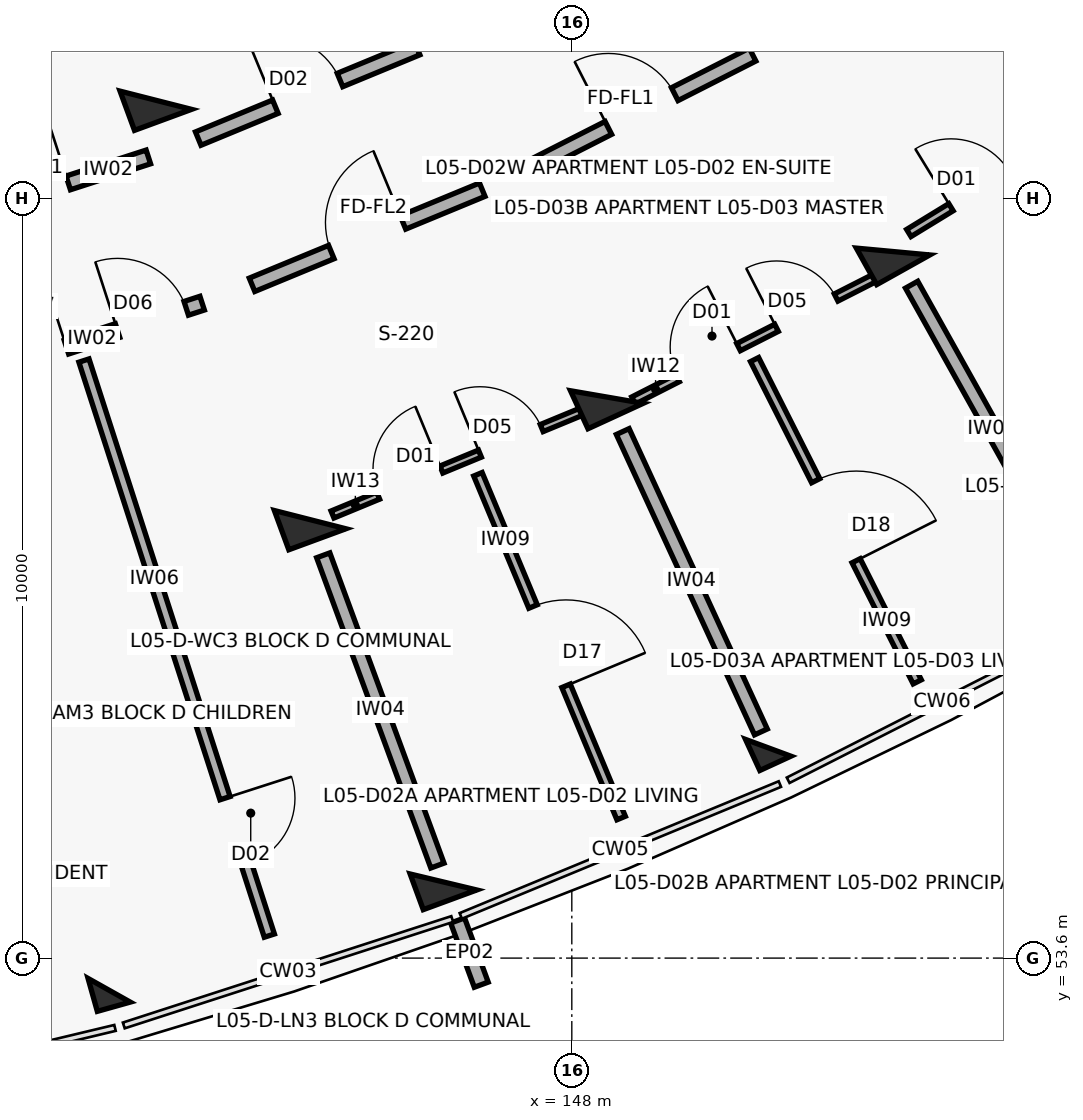
"""IFC4 building model, lengths in metres.
Left out: names, types, materials, properties, quantities, classifications, styles, units other than length and angle.
Written with IfcOpenShell. Run it as: python <this file> out.ifc"""

import sys

from ifc_helpers import new_model, si_unit, direction, frame, frame_2d, origin, origin_2d, place, context, subcontext, project, spatial, rectangle, extrude, element, fill, save


model = new_model("IFC4")
c1 = context("Model", 3, precision=1e-05, world=origin(), true_north=direction((0.0, 1.0)))
c2 = subcontext(c1, "Body", "Model", "MODEL_VIEW")
j1 = project(units=[si_unit("LENGTHUNIT", "METRE"), si_unit("PLANEANGLEUNIT", "RADIAN")], contexts=[c1])
p1 = place(None, origin())
s1 = spatial("IfcSite", under=j1, at=p1, CompositionType="ELEMENT")
p2 = place(p1, origin())
s2 = spatial("IfcBuilding", under=s1, at=p2, CompositionType="ELEMENT")
p3 = place(p2, frame((0.0, 0.0, 17.4)))
s3 = spatial("IfcBuildingStorey", under=s2, at=p3, CompositionType="ELEMENT", Elevation=17.4)
p4 = place(p3, frame((141.913, 53.177, 0.0), z_axis=(0.0, 0.0, 1.0), x_axis=(0.270600445976, -0.962691746426, 0.0)))
e1 = element("IfcColumn", 1, at=p4, inside=s3, PredefinedType="COLUMN", context=c2, shape_type="SweptSolid", body=[
    extrude(rectangle(XDim=0.45, YDim=0.45, at=origin_2d()), origin(), (0.0, 0.0, 1.0), 3.1),
])
for number, where, z_axis, x_axis in (
    (2, (142.527, 64.887, 0.0), (0.0, 0.0, 1.0), (0.345, -0.938, 0.0)),
    (3, (144.557, 59.369, 0.0), (0.0, 0.0, 1.0), (0.345, -0.938, 0.0)),
):
    element("IfcColumn", number, at=place(p3, frame(where, z_axis=z_axis, x_axis=x_axis)), inside=s3, PredefinedType="COLUMN", context=c2, shape_type="SweptSolid", body=[
        extrude(rectangle(XDim=0.55, YDim=0.8, at=origin_2d()), origin(), (0.0, 0.0, 1.0), 3.1),
    ])
p5 = place(p3, frame((146.311, 54.602, 0.0), z_axis=(0.0, 0.0, 1.0), x_axis=(0.345298198999, -0.93849302276, 0.0)))
e4 = element("IfcColumn", 4, at=p5, inside=s3, PredefinedType="COLUMN", context=c2, shape_type="SweptSolid", body=[
    extrude(rectangle(XDim=0.5, YDim=0.75, at=origin_2d()), origin(), (0.0, 0.0, 1.0), 3.1),
])
p6 = place(p3, frame((148.461, 60.982, 0.0), z_axis=(0.0, 0.0, 1.0), x_axis=(0.417867073801, -0.908508177527, 0.0)))
e5 = element("IfcColumn", 5, at=p6, inside=s3, PredefinedType="COLUMN", context=c2, shape_type="SweptSolid", body=[
    extrude(rectangle(XDim=0.55, YDim=0.8, at=origin_2d()), origin(), (0.0, 0.0, 1.0), 3.1),
])
p7 = place(p3, frame((150.584, 56.367, 0.0), z_axis=(0.0, 0.0, 1.0), x_axis=(0.417867073801, -0.908508177527, 0.0)))
e6 = element("IfcColumn", 6, at=p7, inside=s3, PredefinedType="COLUMN", context=c2, shape_type="SweptSolid", body=[
    extrude(rectangle(XDim=0.45, YDim=0.45, at=origin_2d()), origin(), (0.0, 0.0, 1.0), 3.1),
])
p8 = place(p3, frame((152.227, 62.897, 0.0), z_axis=(0.0, 0.0, 1.0), x_axis=(0.487859659139, -0.87292207727, 0.0)))
e7 = element("IfcColumn", 7, at=p8, inside=s3, PredefinedType="COLUMN", context=c2, shape_type="SweptSolid", body=[
    extrude(rectangle(XDim=0.55, YDim=0.8, at=origin_2d()), origin(), (0.0, 0.0, 1.0), 3.1),
])
p9 = place(p3, frame((146.498, 54.095, 0.0), z_axis=(0.0, 0.0, 1.0), x_axis=(0.34529052391, -0.938495846607, 0.0)))
e8 = element("IfcWall", 8, at=p9, inside=s3, PredefinedType="PARAPET", context=c2, shape_type="SweptSolid", body=[
    extrude(rectangle(XDim=0.9, YDim=0.195, at=frame_2d((0.45, 0.0))), origin(), (0.0, 0.0, 1.0), 2.25),
])
p10 = place(p3, frame((140.019, 61.208, 0.0), z_axis=(0.0, 0.0, 1.0), x_axis=(0.951323803878, 0.308193154005, 0.0)))
e9 = element("IfcWall", 9, at=p10, inside=s3, PredefinedType="SOLIDWALL", context=c2, shape_type="SweptSolid", body=[
    extrude(rectangle(XDim=3.277, YDim=0.19, at=frame_2d((1.639, 0.0))), origin(), (0.0, 0.0, 1.0), 2.08),
])
p11 = place(p10, frame((0.28, 0.0, 0.0)))
e10 = element("IfcOpeningElement", 10, at=p11, cuts=e9, PredefinedType="OPENING", context=c2, shape_type="SweptSolid", body=[
    extrude(rectangle(XDim=1.12, YDim=2.15, at=frame_2d((0.56, 1.075))), frame((0.0, 0.105, 0.0), z_axis=(0.0, -1.0, 0.0), x_axis=(1.0, 0.0, 0.0)), (0.0, 0.0, 1.0), 0.21),
])
p12 = place(p10, frame((2.107, 0.0, 0.0)))
e11 = element("IfcOpeningElement", 11, at=p12, cuts=e9, PredefinedType="OPENING", context=c2, shape_type="SweptSolid", body=[
    extrude(rectangle(XDim=0.95, YDim=2.1, at=frame_2d((0.475, 1.05))), frame((0.0, 0.105, 0.0), z_axis=(0.0, -1.0, 0.0), x_axis=(1.0, 0.0, 0.0)), (0.0, 0.0, 1.0), 0.21),
])
p13 = place(p3, frame((139.464, 63.181, 0.0), z_axis=(0.0, 0.0, 1.0), x_axis=(0.951336474448, 0.308154040027, 0.0)))
e12 = element("IfcWall", 12, at=p13, inside=s3, PredefinedType="SOLIDWALL", context=c2, shape_type="SweptSolid", body=[
    extrude(rectangle(XDim=3.116, YDim=0.19, at=frame_2d((1.558, 0.0))), origin(), (0.0, 0.0, 1.0), 2.08),
])
p14 = place(p13, frame((1.108, 0.0, 0.0)))
e13 = element("IfcOpeningElement", 13, at=p14, cuts=e12, PredefinedType="OPENING", context=c2, shape_type="SweptSolid", body=[
    extrude(rectangle(XDim=0.9, YDim=2.1, at=frame_2d((0.45, 1.05))), frame((0.0, 0.105, 0.0), z_axis=(0.0, -1.0, 0.0), x_axis=(1.0, 0.0, 0.0)), (0.0, 0.0, 1.0), 0.21),
])
p15 = place(p3, frame((141.581, 61.462, 0.0), z_axis=(0.0, 0.0, 1.0), x_axis=(0.306824216212, -0.951766200464, 0.0)))
e14 = element("IfcWall", 14, at=p15, inside=s3, PredefinedType="PARTITIONING", context=c2, shape_type="SweptSolid", body=[
    extrude(rectangle(XDim=7.95, YDim=0.14, at=frame_2d((3.975, 0.0))), origin(), (0.0, 0.0, 1.0), 2.08),
])
p16 = place(p15, frame((6.05, 0.0, 0.0)))
e15 = element("IfcOpeningElement", 15, at=p16, cuts=e14, PredefinedType="OPENING", context=c2, shape_type="SweptSolid", body=[
    extrude(rectangle(XDim=0.92, YDim=2.1, at=frame_2d((0.46, 1.05))), frame((0.0, 0.08, 0.0), z_axis=(0.0, -1.0, 0.0), x_axis=(1.0, 0.0, 0.0)), (0.0, 0.0, 1.0), 0.16),
])
p17 = place(p3, frame((143.793, 62.459, 0.0), z_axis=(0.0, 0.0, 1.0), x_axis=(0.924214561665, 0.381873596896, 0.0)))
e16 = element("IfcWall", 16, at=p17, inside=s3, PredefinedType="SOLIDWALL", context=c2, shape_type="SweptSolid", body=[
    extrude(rectangle(XDim=3.277, YDim=0.19, at=frame_2d((1.639, 0.0))), origin(), (0.0, 0.0, 1.0), 2.08),
])
p18 = place(p17, frame((1.128, 0.0, 0.0)))
e17 = element("IfcOpeningElement", 17, at=p18, cuts=e16, PredefinedType="OPENING", context=c2, shape_type="SweptSolid", body=[
    extrude(rectangle(XDim=1.02, YDim=2.15, at=frame_2d((0.51, 1.075))), frame((0.0, 0.105, 0.0), z_axis=(0.0, -1.0, 0.0), x_axis=(1.0, 0.0, 0.0)), (0.0, 0.0, 1.0), 0.21),
])
p19 = place(p3, frame((143.085, 64.383, 0.0), z_axis=(0.0, 0.0, 1.0), x_axis=(0.924213340202, 0.381876553081, 0.0)))
e18 = element("IfcWall", 18, at=p19, inside=s3, PredefinedType="SOLIDWALL", context=c2, shape_type="SweptSolid", body=[
    extrude(rectangle(XDim=3.116, YDim=0.19, at=frame_2d((1.558, 0.0))), origin(), (0.0, 0.0, 1.0), 2.08),
])
p20 = place(p19, frame((1.098, 0.0, 0.0)))
e19 = element("IfcOpeningElement", 19, at=p20, cuts=e18, PredefinedType="OPENING", context=c2, shape_type="SweptSolid", body=[
    extrude(rectangle(XDim=0.92, YDim=2.1, at=frame_2d((0.46, 1.05))), frame((0.0, 0.105, 0.0), z_axis=(0.0, -1.0, 0.0), x_axis=(1.0, 0.0, 0.0)), (0.0, 0.0, 1.0), 0.21),
])
p21 = place(p3, frame((144.852, 59.437, 0.0), z_axis=(0.0, 0.0, 1.0), x_axis=(0.924217547919, 0.381866369453, 0.0)))
e20 = element("IfcWall", 20, at=p21, inside=s3, PredefinedType="PARTITIONING", context=c2, shape_type="SweptSolid", body=[
    extrude(rectangle(XDim=3.628, YDim=0.1, at=frame_2d((1.814, 0.0))), origin(), (0.0, 0.0, 1.0), 2.08),
])
p22 = place(p21, frame((0.65, 0.0, 0.0)))
e21 = element("IfcOpeningElement", 21, at=p22, cuts=e20, PredefinedType="OPENING", context=c2, shape_type="SweptSolid", body=[
    extrude(rectangle(XDim=0.9, YDim=2.1, at=frame_2d((0.45, 1.05))), frame((0.0, 0.06, 0.0), z_axis=(0.0, -1.0, 0.0), x_axis=(1.0, 0.0, 0.0)), (0.0, 0.0, 1.0), 0.12),
])
p23 = place(p21, frame((2.098, 0.0, 0.0)))
e22 = element("IfcOpeningElement", 22, at=p23, cuts=e20, PredefinedType="OPENING", context=c2, shape_type="SweptSolid", body=[
    extrude(rectangle(XDim=0.88, YDim=2.1, at=frame_2d((0.44, 1.05))), frame((0.0, 0.06, 0.0), z_axis=(0.0, -1.0, 0.0), x_axis=(1.0, 0.0, 0.0)), (0.0, 0.0, 1.0), 0.12),
])
p24 = place(p3, frame((146.765, 59.966, 0.0), z_axis=(0.0, 0.0, 1.0), x_axis=(0.384548164276, -0.923104928679, 0.0)))
e23 = element("IfcWall", 23, at=p24, inside=s3, PredefinedType="PARTITIONING", context=c2, shape_type="SweptSolid", body=[
    extrude(rectangle(XDim=4.9, YDim=0.12, at=frame_2d((2.45, 0.0))), origin(), (0.0, 0.0, 1.0), 2.08),
])
p25 = place(p24, frame((1.885, 0.0, 0.0)))
e24 = element("IfcOpeningElement", 24, at=p25, cuts=e23, PredefinedType="OPENING", context=c2, shape_type="SweptSolid", body=[
    extrude(rectangle(XDim=1.13, YDim=2.1, at=frame_2d((0.565, 1.05))), frame((0.0, 0.07, 0.0), z_axis=(0.0, -1.0, 0.0), x_axis=(1.0, 0.0, 0.0)), (0.0, 0.0, 1.0), 0.14),
])
p26 = place(p3, frame((144.73, 58.9, 0.0), z_axis=(0.0, 0.0, 1.0), x_axis=(0.345273579683, -0.938502080537, 0.0)))
e25 = element("IfcWall", 25, at=p26, inside=s3, PredefinedType="SOLIDWALL", context=c2, shape_type="SweptSolid", body=[
    extrude(rectangle(XDim=4.35, YDim=0.185, at=frame_2d((2.175, 0.0))), origin(), (0.0, 0.0, 1.0), 2.08),
])
p27 = place(p3, frame((147.457, 64.003, 0.0), z_axis=(0.0, 0.0, 1.0), x_axis=(0.891412167565, 0.45319349898, 0.0)))
e26 = element("IfcWall", 26, at=p27, inside=s3, PredefinedType="SOLIDWALL", context=c2, shape_type="SweptSolid", body=[
    extrude(rectangle(XDim=3.277, YDim=0.19, at=frame_2d((1.639, 0.0))), origin(), (0.0, 0.0, 1.0), 2.08),
])
p28 = place(p27, frame((1.148, 0.0, 0.0)))
e27 = element("IfcOpeningElement", 27, at=p28, cuts=e26, PredefinedType="OPENING", context=c2, shape_type="SweptSolid", body=[
    extrude(rectangle(XDim=0.98, YDim=2.15, at=frame_2d((0.49, 1.075))), frame((0.0, 0.105, 0.0), z_axis=(0.0, -1.0, 0.0), x_axis=(1.0, 0.0, 0.0)), (0.0, 0.0, 1.0), 0.21),
])
p29 = place(p3, frame((148.812, 60.937, 0.0), z_axis=(0.0, 0.0, 1.0), x_axis=(0.89140212369, 0.453213254309, 0.0)))
e28 = element("IfcWall", 28, at=p29, inside=s3, PredefinedType="PARTITIONING", context=c2, shape_type="SweptSolid", body=[
    extrude(rectangle(XDim=3.64, YDim=0.105, at=frame_2d((1.82, 0.0))), origin(), (0.0, 0.0, 1.0), 2.08),
])
p30 = place(p29, frame((0.65, 0.0, 0.0)))
e29 = element("IfcOpeningElement", 29, at=p30, cuts=e28, PredefinedType="OPENING", context=c2, shape_type="SweptSolid", body=[
    extrude(rectangle(XDim=0.9, YDim=2.1, at=frame_2d((0.45, 1.05))), frame((0.0, 0.062, 0.0), z_axis=(0.0, -1.0, 0.0), x_axis=(1.0, 0.0, 0.0)), (0.0, 0.0, 1.0), 0.125),
])
p31 = place(p29, frame((2.11, 0.0, 0.0)))
e30 = element("IfcOpeningElement", 30, at=p31, cuts=e28, PredefinedType="OPENING", context=c2, shape_type="SweptSolid", body=[
    extrude(rectangle(XDim=0.88, YDim=2.1, at=frame_2d((0.44, 1.05))), frame((0.0, 0.062, 0.0), z_axis=(0.0, -1.0, 0.0), x_axis=(1.0, 0.0, 0.0)), (0.0, 0.0, 1.0), 0.125),
])
p32 = place(p3, frame((150.404, 61.475, 0.0), z_axis=(0.0, 0.0, 1.0), x_axis=(0.450664257057, -0.892693523787, 0.0)))
e31 = element("IfcWall", 31, at=p32, inside=s3, PredefinedType="PARTITIONING", context=c2, shape_type="SweptSolid", body=[
    extrude(rectangle(XDim=4.75, YDim=0.12, at=frame_2d((2.375, 0.0))), origin(), (0.0, 0.0, 1.0), 2.08),
])
p33 = place(p32, frame((1.785, 0.0, 0.0)))
e32 = element("IfcOpeningElement", 32, at=p33, cuts=e31, PredefinedType="OPENING", context=c2, shape_type="SweptSolid", body=[
    extrude(rectangle(XDim=1.18, YDim=2.1, at=frame_2d((0.59, 1.05))), frame((0.0, 0.07, 0.0), z_axis=(0.0, -1.0, 0.0), x_axis=(1.0, 0.0, 0.0)), (0.0, 0.0, 1.0), 0.14),
])
p34 = place(p3, frame((148.67, 60.528, 0.0), z_axis=(0.0, 0.0, 1.0), x_axis=(0.417837051164, -0.908521985796, 0.0)))
e33 = element("IfcWall", 33, at=p34, inside=s3, PredefinedType="SOLIDWALL", context=c2, shape_type="SweptSolid", body=[
    extrude(rectangle(XDim=4.35, YDim=0.185, at=frame_2d((2.175, 0.0))), origin(), (0.0, 0.0, 1.0), 2.08),
])
p35 = place(p3, frame((152.434, 63.141, 0.0), z_axis=(0.0, 0.0, 1.0), x_axis=(0.853089873067, 0.521763996909, 0.0)))
e34 = element("IfcWall", 34, at=p35, inside=s3, PredefinedType="PARTITIONING", context=c2, shape_type="SweptSolid", body=[
    extrude(rectangle(XDim=3.616, YDim=0.11, at=frame_2d((1.808, 0.0))), origin(), (0.0, 0.0, 1.0), 2.08),
])
p36 = place(p35, frame((0.65, 0.0, 0.0)))
e35 = element("IfcOpeningElement", 35, at=p36, cuts=e34, PredefinedType="OPENING", context=c2, shape_type="SweptSolid", body=[
    extrude(rectangle(XDim=0.9, YDim=2.1, at=frame_2d((0.45, 1.05))), frame((0.0, 0.065, 0.0), z_axis=(0.0, -1.0, 0.0), x_axis=(1.0, 0.0, 0.0)), (0.0, 0.0, 1.0), 0.13),
])
p37 = place(p35, frame((2.086, 0.0, 0.0)))
e36 = element("IfcOpeningElement", 36, at=p37, cuts=e34, PredefinedType="OPENING", context=c2, shape_type="SweptSolid", body=[
    extrude(rectangle(XDim=0.88, YDim=2.1, at=frame_2d((0.44, 1.05))), frame((0.0, 0.065, 0.0), z_axis=(0.0, -1.0, 0.0), x_axis=(1.0, 0.0, 0.0)), (0.0, 0.0, 1.0), 0.13),
])
p38 = place(p3, frame((152.471, 62.46, 0.0), z_axis=(0.0, 0.0, 1.0), x_axis=(0.487866639184, -0.872918176218, 0.0)))
e37 = element("IfcWall", 37, at=p38, inside=s3, PredefinedType="SOLIDWALL", context=c2, shape_type="SweptSolid", body=[
    extrude(rectangle(XDim=4.35, YDim=0.185, at=frame_2d((2.175, 0.0))), origin(), (0.0, 0.0, 1.0), 2.08),
])
p39 = place(p11, origin())
e38 = element("IfcDoor", 38, at=p39, inside=s3, OperationType="SINGLE_SWING_RIGHT", PredefinedType="DOOR", context=c2, shape_type="SweptSolid", body=[
    extrude(rectangle(XDim=1.12, YDim=2.15, at=frame_2d((0.56, 1.075))), frame((0.0, 0.025, 0.0), z_axis=(0.0, -1.0, 0.0), x_axis=(1.0, 0.0, 0.0)), (0.0, 0.0, 1.0), 0.05),
])
fill(e10, e38)
p40 = place(p12, origin())
e39 = element("IfcDoor", 39, at=p40, inside=s3, OperationType="SINGLE_SWING_LEFT", PredefinedType="DOOR", context=c2, shape_type="SweptSolid", body=[
    extrude(rectangle(XDim=0.95, YDim=2.1, at=frame_2d((0.475, 1.05))), frame((0.0, 0.025, 0.0), z_axis=(0.0, -1.0, 0.0), x_axis=(1.0, 0.0, 0.0)), (0.0, 0.0, 1.0), 0.05),
])
fill(e11, e39)
p41 = place(p14, origin())
e40 = element("IfcDoor", 40, at=p41, inside=s3, OperationType="SINGLE_SWING_RIGHT", PredefinedType="DOOR", context=c2, shape_type="SweptSolid", body=[
    extrude(rectangle(XDim=0.9, YDim=2.1, at=frame_2d((0.45, 1.05))), frame((0.0, 0.025, 0.0), z_axis=(0.0, -1.0, 0.0), x_axis=(1.0, 0.0, 0.0)), (0.0, 0.0, 1.0), 0.05),
])
fill(e13, e40)
p42 = place(p16, origin())
e41 = element("IfcDoor", 41, at=p42, inside=s3, OperationType="SINGLE_SWING_LEFT", PredefinedType="DOOR", context=c2, shape_type="SweptSolid", body=[
    extrude(rectangle(XDim=0.92, YDim=2.1, at=frame_2d((0.46, 1.05))), frame((0.0, 0.025, 0.0), z_axis=(0.0, -1.0, 0.0), x_axis=(1.0, 0.0, 0.0)), (0.0, 0.0, 1.0), 0.05),
])
fill(e15, e41)
p43 = place(p18, origin())
e42 = element("IfcDoor", 42, at=p43, inside=s3, OperationType="SINGLE_SWING_RIGHT", PredefinedType="DOOR", context=c2, shape_type="SweptSolid", body=[
    extrude(rectangle(XDim=1.02, YDim=2.15, at=frame_2d((0.51, 1.075))), frame((0.0, 0.025, 0.0), z_axis=(0.0, -1.0, 0.0), x_axis=(1.0, 0.0, 0.0)), (0.0, 0.0, 1.0), 0.05),
])
fill(e17, e42)
p44 = place(p20, origin())
e43 = element("IfcDoor", 43, at=p44, inside=s3, OperationType="SINGLE_SWING_LEFT", PredefinedType="DOOR", context=c2, shape_type="SweptSolid", body=[
    extrude(rectangle(XDim=0.92, YDim=2.1, at=frame_2d((0.46, 1.05))), frame((0.0, 0.025, 0.0), z_axis=(0.0, -1.0, 0.0), x_axis=(1.0, 0.0, 0.0)), (0.0, 0.0, 1.0), 0.05),
])
fill(e19, e43)
p45 = place(p22, origin())
e44 = element("IfcDoor", 44, at=p45, inside=s3, OperationType="SINGLE_SWING_RIGHT", PredefinedType="DOOR", context=c2, shape_type="SweptSolid", body=[
    extrude(rectangle(XDim=0.9, YDim=2.1, at=frame_2d((0.45, 1.05))), frame((0.0, 0.025, 0.0), z_axis=(0.0, -1.0, 0.0), x_axis=(1.0, 0.0, 0.0)), (0.0, 0.0, 1.0), 0.05),
])
fill(e21, e44)
p46 = place(p23, origin())
e45 = element("IfcDoor", 45, at=p46, inside=s3, OperationType="SINGLE_SWING_LEFT", PredefinedType="DOOR", context=c2, shape_type="SweptSolid", body=[
    extrude(rectangle(XDim=0.88, YDim=2.1, at=frame_2d((0.44, 1.05))), frame((0.0, 0.025, 0.0), z_axis=(0.0, -1.0, 0.0), x_axis=(1.0, 0.0, 0.0)), (0.0, 0.0, 1.0), 0.05),
])
fill(e22, e45)
p47 = place(p25, origin())
e46 = element("IfcDoor", 46, at=p47, inside=s3, OperationType="SINGLE_SWING_RIGHT", PredefinedType="DOOR", context=c2, shape_type="SweptSolid", body=[
    extrude(rectangle(XDim=1.13, YDim=2.1, at=frame_2d((0.565, 1.05))), frame((0.0, 0.025, 0.0), z_axis=(0.0, -1.0, 0.0), x_axis=(1.0, 0.0, 0.0)), (0.0, 0.0, 1.0), 0.05),
])
fill(e24, e46)
p48 = place(p28, origin())
e47 = element("IfcDoor", 47, at=p48, inside=s3, OperationType="SINGLE_SWING_LEFT", PredefinedType="DOOR", context=c2, shape_type="SweptSolid", body=[
    extrude(rectangle(XDim=0.98, YDim=2.15, at=frame_2d((0.49, 1.075))), frame((0.0, 0.025, 0.0), z_axis=(0.0, -1.0, 0.0), x_axis=(1.0, 0.0, 0.0)), (0.0, 0.0, 1.0), 0.05),
])
fill(e27, e47)
p49 = place(p30, origin())
e48 = element("IfcDoor", 48, at=p49, inside=s3, OperationType="SINGLE_SWING_RIGHT", PredefinedType="DOOR", context=c2, shape_type="SweptSolid", body=[
    extrude(rectangle(XDim=0.9, YDim=2.1, at=frame_2d((0.45, 1.05))), frame((0.0, 0.025, 0.0), z_axis=(0.0, -1.0, 0.0), x_axis=(1.0, 0.0, 0.0)), (0.0, 0.0, 1.0), 0.05),
])
fill(e29, e48)
p50 = place(p31, origin())
e49 = element("IfcDoor", 49, at=p50, inside=s3, OperationType="SINGLE_SWING_LEFT", PredefinedType="DOOR", context=c2, shape_type="SweptSolid", body=[
    extrude(rectangle(XDim=0.88, YDim=2.1, at=frame_2d((0.44, 1.05))), frame((0.0, 0.025, 0.0), z_axis=(0.0, -1.0, 0.0), x_axis=(1.0, 0.0, 0.0)), (0.0, 0.0, 1.0), 0.05),
])
fill(e30, e49)
p51 = place(p33, origin())
e50 = element("IfcDoor", 50, at=p51, inside=s3, OperationType="SINGLE_SWING_RIGHT", PredefinedType="DOOR", context=c2, shape_type="SweptSolid", body=[
    extrude(rectangle(XDim=1.18, YDim=2.1, at=frame_2d((0.59, 1.05))), frame((0.0, 0.025, 0.0), z_axis=(0.0, -1.0, 0.0), x_axis=(1.0, 0.0, 0.0)), (0.0, 0.0, 1.0), 0.05),
])
fill(e32, e50)
p52 = place(p36, origin())
e51 = element("IfcDoor", 51, at=p52, inside=s3, OperationType="SINGLE_SWING_LEFT", PredefinedType="DOOR", context=c2, shape_type="SweptSolid", body=[
    extrude(rectangle(XDim=0.9, YDim=2.1, at=frame_2d((0.45, 1.05))), frame((0.0, 0.025, 0.0), z_axis=(0.0, -1.0, 0.0), x_axis=(1.0, 0.0, 0.0)), (0.0, 0.0, 1.0), 0.05),
])
fill(e35, e51)
save(model, sys.argv[1])
